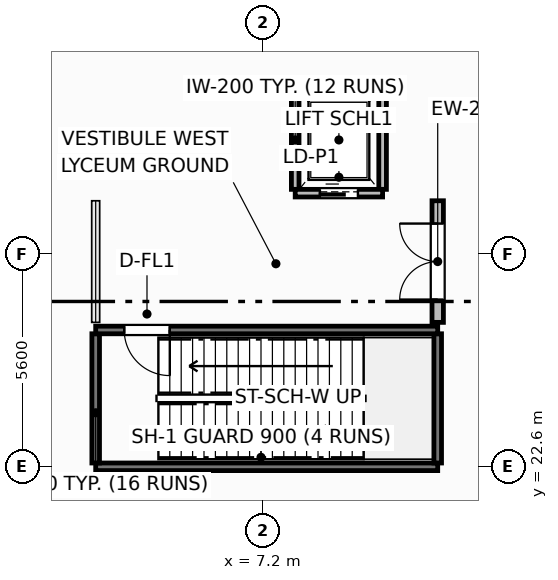
"""IFC4 building model, lengths in metres.
Left out: names, types, materials, properties, quantities, classifications, styles, units other than length and angle.
Written with IfcOpenShell. Run it as: python <this file> out.ifc"""

import sys

from ifc_helpers import new_model, si_unit, direction, frame, frame_2d, origin, place, context, subcontext, project, spatial, rectangle, extrude, element, fill, save


model = new_model("IFC4")
c1 = context("Model", 3, precision=1e-05, world=origin(), true_north=direction((0.0, 1.0)))
c2 = subcontext(c1, "Body", "Model", "MODEL_VIEW")
j1 = project(units=[si_unit("LENGTHUNIT", "METRE"), si_unit("PLANEANGLEUNIT", "RADIAN")], contexts=[c1])
p1 = place(None, origin())
s1 = spatial("IfcSite", under=j1, at=p1, CompositionType="ELEMENT")
p2 = place(p1, origin())
s2 = spatial("IfcBuilding", under=s1, at=p2, CompositionType="ELEMENT")
p3 = place(p2, origin())
s3 = spatial("IfcBuildingStorey", under=s2, at=p3, CompositionType="ELEMENT", Elevation=0.0)
p4 = place(p3, frame((11.8, 26.4, 0.0), z_axis=(0.0, 0.0, 1.0), x_axis=(0.0, 1.0, 0.0)))
e1 = element("IfcWall", 1, at=p4, inside=s3, PredefinedType="SOLIDWALL", context=c2, shape_type="SweptSolid", body=[
    extrude(rectangle(XDim=3.2, YDim=0.3, at=frame_2d((1.6, 0.0))), origin(), (0.0, 0.0, 1.0), 5.58),
])
p5 = place(p4, frame((0.6, 0.0, 0.0)))
e2 = element("IfcOpeningElement", 2, at=p5, cuts=e1, PredefinedType="OPENING", context=c2, shape_type="SweptSolid", body=[
    extrude(rectangle(XDim=2.0, YDim=2.45, at=frame_2d((1.0, 1.225))), frame((0.0, 0.16, 0.0), z_axis=(0.0, -1.0, 0.0), x_axis=(1.0, 0.0, 0.0)), (0.0, 0.0, 1.0), 0.32),
])
p6 = place(p3, frame((2.8, 22.6, 0.0), z_axis=(0.0, 0.0, 1.0), x_axis=(1.0, 0.0, 0.0)))
e3 = element("IfcWall", 3, at=p6, inside=s3, PredefinedType="SHEAR", context=c2, shape_type="SweptSolid", body=[
    extrude(rectangle(XDim=9.0, YDim=0.2, at=frame_2d((4.5, 0.0))), origin(), (0.0, 0.0, 1.0), 6.6),
])
for number, where, z_axis, x_axis in (
    (4, (2.8, 22.7, 0.0), (0.0, 0.0, 1.0), (0.0, 1.0, 0.0)),
    (5, (11.8, 22.7, 0.0), (0.0, 0.0, 1.0), (0.0, 1.0, 0.0)),
):
    element("IfcWall", number, at=place(p3, frame(where, z_axis=z_axis, x_axis=x_axis)), inside=s3, PredefinedType="SHEAR", context=c2, shape_type="SweptSolid", body=[
        extrude(rectangle(XDim=3.4, YDim=0.2, at=frame_2d((1.7, 0.0))), origin(), (0.0, 0.0, 1.0), 6.6),
    ])
p7 = place(p3, frame((11.8, 26.2, 0.0), z_axis=(0.0, 0.0, 1.0), x_axis=(-1.0, 0.0, 0.0)))
e6 = element("IfcWall", 6, at=p7, inside=s3, PredefinedType="SHEAR", context=c2, shape_type="SweptSolid", body=[
    extrude(rectangle(XDim=9.0, YDim=0.2, at=frame_2d((4.5, 0.0))), origin(), (0.0, 0.0, 1.0), 6.6),
])
p8 = place(p7, frame((7.05, 0.0, 0.0)))
e7 = element("IfcOpeningElement", 7, at=p8, cuts=e6, PredefinedType="OPENING", context=c2, shape_type="SweptSolid", body=[
    extrude(rectangle(XDim=1.2, YDim=2.15, at=frame_2d((0.6, 1.075))), frame((0.0, 0.11, 0.0), z_axis=(0.0, -1.0, 0.0), x_axis=(1.0, 0.0, 0.0)), (0.0, 0.0, 1.0), 0.22),
])
p9 = place(p3, frame((8.05, 32.6, 0.0), z_axis=(0.0, 0.0, 1.0), x_axis=(1.0, 0.0, 0.0)))
e8 = element("IfcWall", 8, at=p9, inside=s3, PredefinedType="PARTITIONING", context=c2, shape_type="SweptSolid", body=[
    extrude(rectangle(XDim=2.3, YDim=0.2, at=frame_2d((1.15, 0.0))), origin(), (0.0, 0.0, 1.0), 5.52),
])
for number, where, z_axis, x_axis in (
    (9, (8.05, 29.9, 0.0), (0.0, 0.0, 1.0), (0.0, 1.0, 0.0)),
    (10, (10.35, 29.9, 0.0), (0.0, 0.0, 1.0), (0.0, 1.0, 0.0)),
):
    element("IfcWall", number, at=place(p3, frame(where, z_axis=z_axis, x_axis=x_axis)), inside=s3, PredefinedType="PARTITIONING", context=c2, shape_type="SweptSolid", body=[
        extrude(rectangle(XDim=2.6, YDim=0.2, at=frame_2d((1.3, 0.0))), origin(), (0.0, 0.0, 1.0), 5.52),
    ])
p10 = place(p3, frame((8.05, 29.8, 0.0), z_axis=(0.0, 0.0, 1.0), x_axis=(1.0, 0.0, 0.0)))
e11 = element("IfcWall", 11, at=p10, inside=s3, PredefinedType="PARTITIONING", context=c2, shape_type="SweptSolid", body=[
    extrude(rectangle(XDim=2.3, YDim=0.2, at=frame_2d((1.15, 0.0))), origin(), (0.0, 0.0, 1.0), 5.52),
])
p11 = place(p10, frame((0.65, 0.0, 0.0)))
e12 = element("IfcOpeningElement", 12, at=p11, cuts=e11, PredefinedType="OPENING", context=c2, shape_type="SweptSolid", body=[
    extrude(rectangle(XDim=1.0, YDim=2.15, at=frame_2d((0.5, 1.075))), frame((0.0, 0.11, 0.0), z_axis=(0.0, -1.0, 0.0), x_axis=(1.0, 0.0, 0.0)), (0.0, 0.0, 1.0), 0.22),
])
p12 = place(p5, origin())
e13 = element("IfcDoor", 13, at=p12, inside=s3, OperationType="DOUBLE_DOOR_SINGLE_SWING", PredefinedType="DOOR", context=c2, shape_type="SweptSolid", body=[
    extrude(rectangle(XDim=2.0, YDim=2.45, at=frame_2d((1.0, 1.225))), frame((0.0, 0.025, 0.0), z_axis=(0.0, -1.0, 0.0), x_axis=(1.0, 0.0, 0.0)), (0.0, 0.0, 1.0), 0.05),
])
fill(e2, e13)
p13 = place(p8, origin())
e14 = element("IfcDoor", 14, at=p13, inside=s3, OperationType="SINGLE_SWING_LEFT", PredefinedType="DOOR", context=c2, shape_type="SweptSolid", body=[
    extrude(rectangle(XDim=1.2, YDim=2.15, at=frame_2d((0.6, 1.075))), frame((0.0, 0.025, 0.0), z_axis=(0.0, -1.0, 0.0), x_axis=(1.0, 0.0, 0.0)), (0.0, 0.0, 1.0), 0.05),
])
fill(e7, e14)
p14 = place(p11, origin())
e15 = element("IfcDoor", 15, at=p14, inside=s3, OperationType="SLIDING_TO_LEFT", PredefinedType="DOOR", context=c2, shape_type="SweptSolid", body=[
    extrude(rectangle(XDim=1.0, YDim=2.15, at=frame_2d((0.5, 1.075))), frame((0.0, 0.025, 0.0), z_axis=(0.0, -1.0, 0.0), x_axis=(1.0, 0.0, 0.0)), (0.0, 0.0, 1.0), 0.05),
])
fill(e12, e15)
save(model, sys.argv[1])
